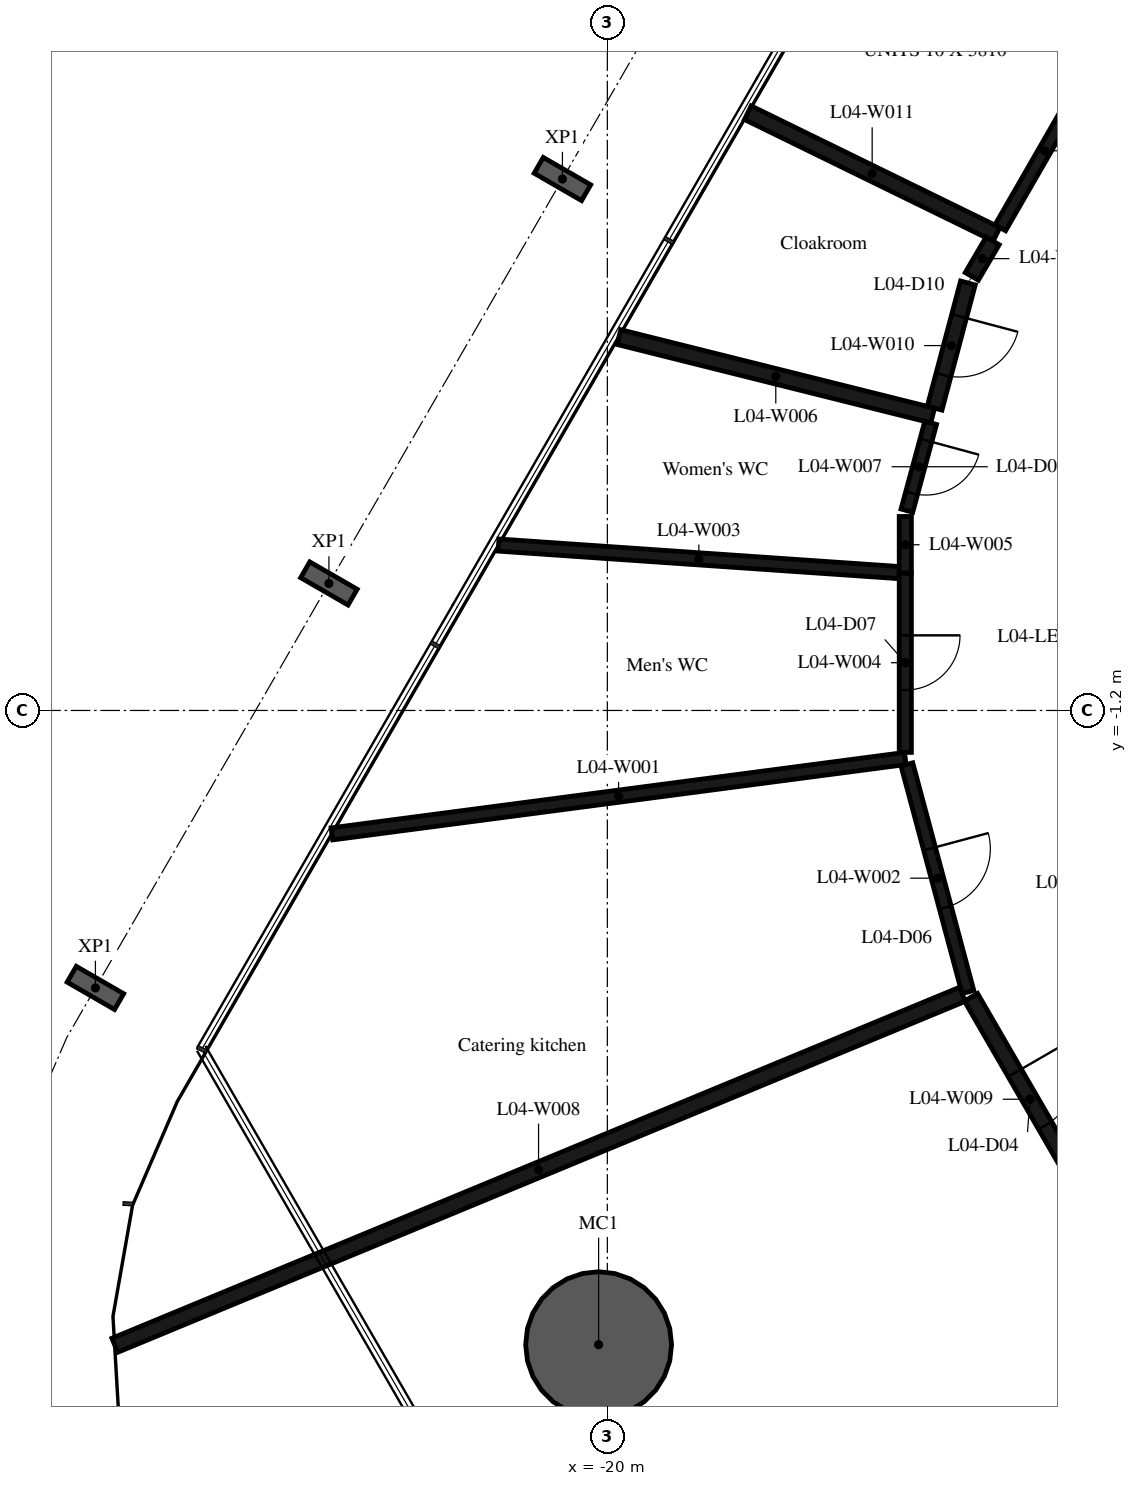
"""IFC4 building model, lengths in metres.
Left out: names, types, materials, properties, quantities, classifications, styles, units other than length and angle.
Written with IfcOpenShell. Run it as: python <this file> out.ifc"""

import sys

from ifc_helpers import new_model, si_unit, direction, frame, frame_2d, origin, origin_2d, place, context, subcontext, project, spatial, rectangle, hollow_circle, i_section, extrude, element, fill, save


model = new_model("IFC4")
c1 = context("Model", 3, precision=1e-05, world=origin(), true_north=direction((0.0, 1.0)))
c2 = subcontext(c1, "Body", "Model", "MODEL_VIEW")
j1 = project(units=[si_unit("LENGTHUNIT", "METRE"), si_unit("PLANEANGLEUNIT", "RADIAN")], contexts=[c1])
p1 = place(None, origin())
s1 = spatial("IfcSite", under=j1, at=p1, CompositionType="ELEMENT")
p2 = place(p1, origin())
s2 = spatial("IfcBuilding", under=s1, at=p2, CompositionType="ELEMENT")
p3 = place(p2, frame((0.0, 0.0, 23.4)))
s3 = spatial("IfcBuildingStorey", under=s2, at=p3, CompositionType="ELEMENT", Elevation=23.4)
p4 = place(p3, frame((-20.144, -11.63, -0.38), z_axis=(0.0, 0.0, 1.0), x_axis=(1.0, 0.0, 0.0)))
e1 = element("IfcColumn", 1, at=p4, inside=s3, PredefinedType="COLUMN", context=c2, shape_type="SweptSolid", body=[
    extrude(hollow_circle(Radius=1.2, WallThickness=0.06, at=origin_2d()), origin(), (0.0, 0.0, 1.0), 4.8),
])
for number, where, z_axis, x_axis in (
    (2, (-20.739, 7.539, -0.38), (0.0, 0.0, 1.0), (0.5, 0.866, 0.0)),
    (3, (-24.579, 0.888, -0.38), (0.0, 0.0, 1.0), (0.5, 0.866, 0.0)),
    (4, (-28.419, -5.763, -0.38), (0.0, 0.0, 1.0), (0.5, 0.866, 0.0)),
):
    element("IfcColumn", number, at=place(p3, frame(where, z_axis=z_axis, x_axis=x_axis)), inside=s3, PredefinedType="COLUMN", context=c2, shape_type="SweptSolid", body=[
        extrude(i_section(OverallWidth=0.3, OverallDepth=0.9, WebThickness=0.019, FlangeThickness=0.035, FilletRadius=0.03, at=origin_2d()), origin(), (0.0, 0.0, 1.0), 4.8),
    ])
p5 = place(p3, frame((-15.1, -1.99, 0.0), z_axis=(0.0, 0.0, 1.0), x_axis=(-0.99146503856, -0.130372839634, 0.0)))
e5 = element("IfcWall", 5, at=p5, inside=s3, PredefinedType="PARTITIONING", context=c2, shape_type="SweptSolid", body=[
    extrude(rectangle(XDim=9.511, YDim=0.2, at=frame_2d((4.756, 0.0))), origin(), (0.0, 0.0, 1.0), 4.42),
])
p6 = place(p3, frame((-15.074, -2.087, 0.0), z_axis=(0.0, 0.0, 1.0), x_axis=(0.259026804199, -0.965870133458, 0.0)))
e6 = element("IfcWall", 6, at=p6, inside=s3, PredefinedType="PARTITIONING", context=c2, shape_type="SweptSolid", body=[
    extrude(rectangle(XDim=3.876, YDim=0.2, at=frame_2d((1.938, 0.0))), origin(), (0.0, 0.0, 1.0), 4.42),
])
p7 = place(p6, frame((1.438, 0.0, 0.0)))
e7 = element("IfcOpeningElement", 7, at=p7, cuts=e6, PredefinedType="OPENING", context=c2, shape_type="SweptSolid", body=[
    extrude(rectangle(XDim=1.0, YDim=2.1, at=frame_2d((0.5, 1.05))), frame((0.0, 0.11, 0.0), z_axis=(0.0, -1.0, 0.0), x_axis=(1.0, 0.0, 0.0)), (0.0, 0.0, 1.0), 0.22),
])
p8 = place(p3, frame((-15.2, 1.067, 0.0), z_axis=(0.0, 0.0, 1.0), x_axis=(-0.99764465257, 0.068594075542, 0.0)))
e8 = element("IfcWall", 8, at=p8, inside=s3, PredefinedType="PARTITIONING", context=c2, shape_type="SweptSolid", body=[
    extrude(rectangle(XDim=6.606, YDim=0.2, at=frame_2d((3.303, 0.0))), origin(), (0.0, 0.0, 1.0), 4.42),
])
p9 = place(p3, frame((-15.1, 1.06, 0.0), z_axis=(0.0, 0.0, 1.0), x_axis=(0.0, -1.0, 0.0)))
e9 = element("IfcWall", 9, at=p9, inside=s3, PredefinedType="PARTITIONING", context=c2, shape_type="SweptSolid", body=[
    extrude(rectangle(XDim=2.95, YDim=0.2, at=frame_2d((1.475, 0.0))), origin(), (0.0, 0.0, 1.0), 4.42),
])
p10 = place(p9, frame((1.025, 0.0, 0.0)))
e10 = element("IfcOpeningElement", 10, at=p10, cuts=e9, PredefinedType="OPENING", context=c2, shape_type="SweptSolid", body=[
    extrude(rectangle(XDim=0.9, YDim=2.1, at=frame_2d((0.45, 1.05))), frame((0.0, 0.11, 0.0), z_axis=(0.0, -1.0, 0.0), x_axis=(1.0, 0.0, 0.0)), (0.0, 0.0, 1.0), 0.22),
])
p11 = place(p3, frame((-15.1, 1.99, 0.0), z_axis=(0.0, 0.0, 1.0), x_axis=(0.0, -1.0, 0.0)))
e11 = element("IfcWall", 11, at=p11, inside=s3, PredefinedType="PARTITIONING", context=c2, shape_type="SweptSolid", body=[
    extrude(rectangle(XDim=0.93, YDim=0.2, at=frame_2d((0.465, 0.0))), origin(), (0.0, 0.0, 1.0), 4.42),
])
p12 = place(p3, frame((-14.65, 3.65, 0.0), z_axis=(0.0, 0.0, 1.0), x_axis=(-0.970142500145, 0.242535625036, 0.0)))
e12 = element("IfcWall", 12, at=p12, inside=s3, PredefinedType="PARTITIONING", context=c2, shape_type="SweptSolid", body=[
    extrude(rectangle(XDim=5.319, YDim=0.25, at=frame_2d((2.659, 0.0))), origin(), (0.0, 0.0, 1.0), 4.42),
])
p13 = place(p3, frame((-14.683, 3.529, 0.0), z_axis=(0.0, 0.0, 1.0), x_axis=(-0.261624677088, -0.965169688883, 0.0)))
e13 = element("IfcWall", 13, at=p13, inside=s3, PredefinedType="PARTITIONING", context=c2, shape_type="SweptSolid", body=[
    extrude(rectangle(XDim=1.495, YDim=0.2, at=frame_2d((0.748, 0.0))), origin(), (0.0, 0.0, 1.0), 4.42),
])
p14 = place(p13, frame((0.298, 0.0, 0.0)))
e14 = element("IfcOpeningElement", 14, at=p14, cuts=e13, PredefinedType="OPENING", context=c2, shape_type="SweptSolid", body=[
    extrude(rectangle(XDim=0.9, YDim=2.1, at=frame_2d((0.45, 1.05))), frame((0.0, 0.11, 0.0), z_axis=(0.0, -1.0, 0.0), x_axis=(1.0, 0.0, 0.0)), (0.0, 0.0, 1.0), 0.22),
])
p15 = place(p3, frame((-14.162, -5.868, 0.0), z_axis=(0.0, 0.0, 1.0), x_axis=(-0.923914077449, -0.382600022859, 0.0)))
e15 = element("IfcWall", 15, at=p15, inside=s3, PredefinedType="PARTITIONING", context=c2, shape_type="SweptSolid", body=[
    extrude(rectangle(XDim=15.085, YDim=0.25, at=frame_2d((7.543, 0.0))), origin(), (0.0, 0.0, 1.0), 4.42),
])
p16 = place(p3, frame((-14.02, -5.917, 0.0), z_axis=(0.0, 0.0, 1.0), x_axis=(0.500733182901, -0.865601686425, 0.0)))
e16 = element("IfcWall", 16, at=p16, inside=s3, PredefinedType="PARTITIONING", context=c2, shape_type="SweptSolid", body=[
    extrude(rectangle(XDim=3.874, YDim=0.25, at=frame_2d((1.937, 0.0))), origin(), (0.0, 0.0, 1.0), 4.42),
])
p17 = place(p16, frame((1.437, 0.0, 0.0)))
e17 = element("IfcOpeningElement", 17, at=p17, cuts=e16, PredefinedType="OPENING", context=c2, shape_type="SweptSolid", body=[
    extrude(rectangle(XDim=1.0, YDim=2.1, at=frame_2d((0.5, 1.05))), frame((0.0, 0.135, 0.0), z_axis=(0.0, -1.0, 0.0), x_axis=(1.0, 0.0, 0.0)), (0.0, 0.0, 1.0), 0.27),
])
p18 = place(p3, frame((-14.07, 5.83, 0.0), z_axis=(0.0, 0.0, 1.0), x_axis=(-0.25709213915, -0.9663868956, 0.0)))
e18 = element("IfcWall", 18, at=p18, inside=s3, PredefinedType="PARTITIONING", context=c2, shape_type="SweptSolid", body=[
    extrude(rectangle(XDim=2.131, YDim=0.25, at=frame_2d((1.065, 0.0))), origin(), (0.0, 0.0, 1.0), 4.42),
])
p19 = place(p18, frame((0.565, 0.0, 0.0)))
e19 = element("IfcOpeningElement", 19, at=p19, cuts=e18, PredefinedType="OPENING", context=c2, shape_type="SweptSolid", body=[
    extrude(rectangle(XDim=1.0, YDim=2.1, at=frame_2d((0.5, 1.05))), frame((0.0, 0.135, 0.0), z_axis=(0.0, -1.0, 0.0), x_axis=(1.0, 0.0, 0.0)), (0.0, 0.0, 1.0), 0.27),
])
p20 = place(p3, frame((-13.6, 6.63, 0.0), z_axis=(0.0, 0.0, 1.0), x_axis=(-0.898339215614, 0.43930246265, 0.0)))
e20 = element("IfcWall", 20, at=p20, inside=s3, PredefinedType="PARTITIONING", context=c2, shape_type="SweptSolid", body=[
    extrude(rectangle(XDim=4.553, YDim=0.25, at=frame_2d((2.276, 0.0))), origin(), (0.0, 0.0, 1.0), 4.42),
])
p21 = place(p3, frame((-13.663, 6.522, 0.0), z_axis=(0.0, 0.0, 1.0), x_axis=(-0.506421854576, -0.862285860494, 0.0)))
e21 = element("IfcWall", 21, at=p21, inside=s3, PredefinedType="PARTITIONING", context=c2, shape_type="SweptSolid", body=[
    extrude(rectangle(XDim=0.678, YDim=0.25, at=frame_2d((0.339, 0.0))), origin(), (0.0, 0.0, 1.0), 4.42),
])
p22 = place(p3, frame((-12.08, 9.27, 0.0), z_axis=(0.0, 0.0, 1.0), x_axis=(-0.498926404598, -0.866644357736, 0.0)))
e22 = element("IfcWall", 22, at=p22, inside=s3, PredefinedType="PARTITIONING", context=c2, shape_type="SweptSolid", body=[
    extrude(rectangle(XDim=2.921, YDim=0.2, at=frame_2d((1.461, 0.0))), origin(), (0.0, 0.0, 1.0), 4.42),
])
p23 = place(p3, frame((-9.346, -12.179, 0.0), z_axis=(0.0, 0.0, 1.0), x_axis=(-0.608560359422, -0.793507585937, 0.0)))
e23 = element("IfcWall", 23, at=p23, inside=s3, PredefinedType="PARTITIONING", context=c2, shape_type="SweptSolid", body=[
    extrude(rectangle(XDim=9.39, YDim=0.25, at=frame_2d((4.695, 0.0))), origin(), (0.0, 0.0, 1.0), 4.42),
])
p24 = place(p17, origin())
e24 = element("IfcDoor", 24, at=p24, inside=s3, OperationType="SINGLE_SWING_LEFT", PredefinedType="DOOR", context=c2, shape_type="SweptSolid", body=[
    extrude(rectangle(XDim=1.0, YDim=2.1, at=frame_2d((0.5, 1.05))), frame((0.0, 0.025, 0.0), z_axis=(0.0, -1.0, 0.0), x_axis=(1.0, 0.0, 0.0)), (0.0, 0.0, 1.0), 0.05),
])
fill(e17, e24)
p25 = place(p7, origin())
e25 = element("IfcDoor", 25, at=p25, inside=s3, OperationType="SINGLE_SWING_LEFT", PredefinedType="DOOR", context=c2, shape_type="SweptSolid", body=[
    extrude(rectangle(XDim=1.0, YDim=2.1, at=frame_2d((0.5, 1.05))), frame((0.0, 0.025, 0.0), z_axis=(0.0, -1.0, 0.0), x_axis=(1.0, 0.0, 0.0)), (0.0, 0.0, 1.0), 0.05),
])
fill(e7, e25)
p26 = place(p10, origin())
e26 = element("IfcDoor", 26, at=p26, inside=s3, OperationType="SINGLE_SWING_LEFT", PredefinedType="DOOR", context=c2, shape_type="SweptSolid", body=[
    extrude(rectangle(XDim=0.9, YDim=2.1, at=frame_2d((0.45, 1.05))), frame((0.0, 0.025, 0.0), z_axis=(0.0, -1.0, 0.0), x_axis=(1.0, 0.0, 0.0)), (0.0, 0.0, 1.0), 0.05),
])
fill(e10, e26)
p27 = place(p14, origin())
e27 = element("IfcDoor", 27, at=p27, inside=s3, OperationType="SINGLE_SWING_LEFT", PredefinedType="DOOR", context=c2, shape_type="SweptSolid", body=[
    extrude(rectangle(XDim=0.9, YDim=2.1, at=frame_2d((0.45, 1.05))), frame((0.0, 0.025, 0.0), z_axis=(0.0, -1.0, 0.0), x_axis=(1.0, 0.0, 0.0)), (0.0, 0.0, 1.0), 0.05),
])
fill(e14, e27)
p28 = place(p19, origin())
e28 = element("IfcDoor", 28, at=p28, inside=s3, OperationType="SINGLE_SWING_LEFT", PredefinedType="DOOR", context=c2, shape_type="SweptSolid", body=[
    extrude(rectangle(XDim=1.0, YDim=2.1, at=frame_2d((0.5, 1.05))), frame((0.0, 0.025, 0.0), z_axis=(0.0, -1.0, 0.0), x_axis=(1.0, 0.0, 0.0)), (0.0, 0.0, 1.0), 0.05),
])
fill(e19, e28)
save(model, sys.argv[1])
